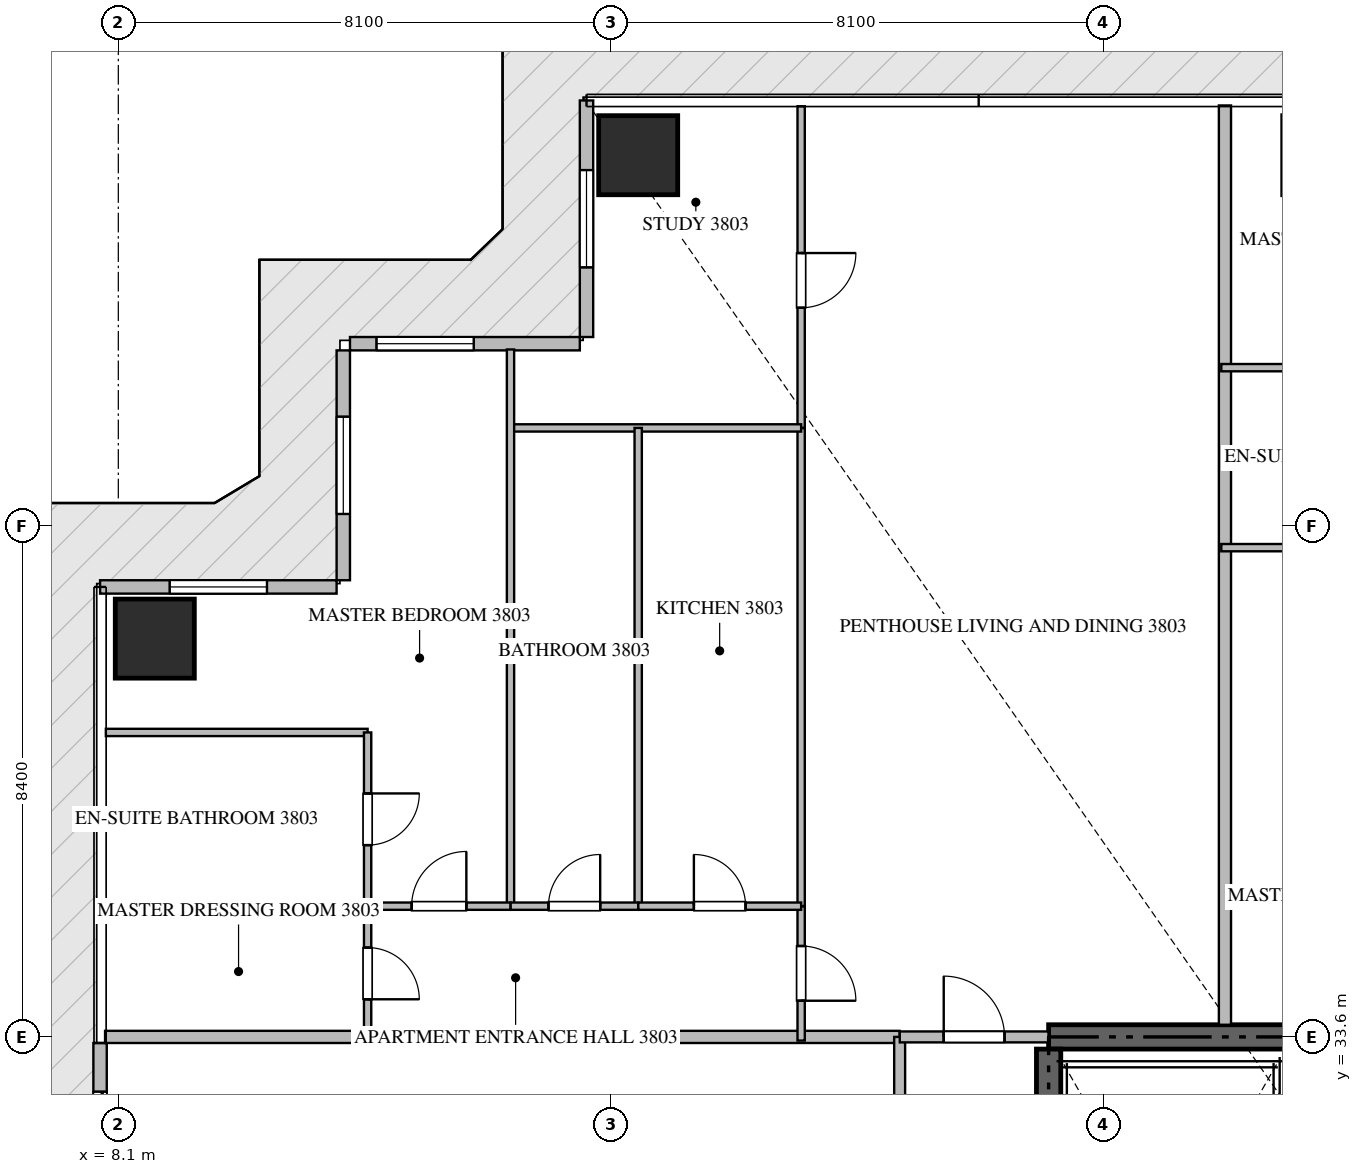
"""IFC4 building model, lengths in metres.
Left out: names, types, materials, properties, quantities, classifications, styles, units other than length and angle.
Written with IfcOpenShell. Run it as: python <this file> out.ifc"""

import sys

from ifc_helpers import new_model, si_unit, direction, frame, frame_2d, origin, origin_2d, place, context, subcontext, project, spatial, rectangle, extrude, source, transform, mapped, element, fill, save


model = new_model("IFC4")
c1 = context("Model", 3, precision=1e-05, world=origin(), true_north=direction((0.0, 1.0)))
c2 = subcontext(c1, "Body", "Model", "MODEL_VIEW")
j1 = project(units=[si_unit("LENGTHUNIT", "METRE"), si_unit("PLANEANGLEUNIT", "RADIAN")], contexts=[c1])
p1 = place(None, origin())
s1 = spatial("IfcSite", under=j1, at=p1, CompositionType="ELEMENT")
p2 = place(p1, origin())
s2 = spatial("IfcBuilding", under=s1, at=p2, CompositionType="ELEMENT")
p3 = place(p2, frame((0.0, 0.0, 153.9)))
s3 = spatial("IfcBuildingStorey", under=s2, at=p3, CompositionType="ELEMENT", Elevation=153.9)
p4 = place(p3, frame((41.4, 33.6, -0.26), z_axis=(0.0, 0.0, 1.0), x_axis=(-1.0, 0.0, 0.0)))
e1 = element("IfcWall", 1, at=p4, inside=s3, PredefinedType="SHEAR", context=c2, shape_type="SweptSolid", body=[
    extrude(rectangle(XDim=18.0, YDim=0.4, at=frame_2d((9.0, 0.0))), origin(), (0.0, 0.0, 1.0), 3.748),
])
p5 = place(p3, frame((23.4, 24.25, -0.26), z_axis=(0.0, 0.0, 1.0), x_axis=(0.0, 1.0, 0.0)))
e2 = element("IfcWall", 2, at=p5, inside=s3, PredefinedType="SHEAR", context=c2, shape_type="SweptSolid", body=[
    extrude(rectangle(XDim=9.15, YDim=0.4, at=frame_2d((4.575, 0.0))), origin(), (0.0, 0.0, 1.0), 3.748),
])
m1 = source(origin(), c2, "Body", "SweptSolid", [
    extrude(rectangle(XDim=1.3, YDim=1.3, at=origin_2d()), origin(), (0.0, 0.0, 1.0), 3.75),
])
for number, where, z_axis, x_axis in (
    (3, (16.65, 48.1, -0.26), (0.0, 0.0, 1.0), (1.0, 0.0, 0.0)),
    (4, (8.7, 40.15, -0.26), (0.0, 0.0, 1.0), (1.0, 0.0, 0.0)),
):
    element("IfcColumn", number, at=place(p3, frame(where, z_axis=z_axis, x_axis=x_axis)), inside=s3, PredefinedType="COLUMN", context=c2, shape_type="MappedRepresentation", body=[
        mapped(m1, transform((0.0, 0.0, 0.0), scale=1.0)),
    ])
p6 = place(p3, frame((15.8, 49.0, 0.0), z_axis=(0.0, 0.0, 1.0), x_axis=(0.0, -1.0, 0.0)))
e5 = element("IfcWall", 5, at=p6, inside=s3, PredefinedType="ELEMENTEDWALL", context=c2, shape_type="SweptSolid", body=[
    extrude(rectangle(XDim=3.89, YDim=0.22, at=frame_2d((1.945, 0.0))), origin(), (0.0, 0.0, 1.0), 3.475),
])
p7 = place(p6, frame((1.145, 0.0, 0.65)))
e6 = element("IfcOpeningElement", 6, at=p7, cuts=e5, PredefinedType="OPENING", context=c2, shape_type="SweptSolid", body=[
    extrude(rectangle(XDim=1.6, YDim=2.1, at=frame_2d((0.8, 1.05))), frame((0.0, 0.12, 0.0), z_axis=(0.0, -1.0, 0.0), x_axis=(1.0, 0.0, 0.0)), (0.0, 0.0, 1.0), 0.24),
])
p8 = place(p3, frame((15.69, 45.0, 0.0), z_axis=(0.0, 0.0, 1.0), x_axis=(-1.0, 0.0, 0.0)))
e7 = element("IfcWall", 7, at=p8, inside=s3, PredefinedType="ELEMENTEDWALL", context=c2, shape_type="SweptSolid", body=[
    extrude(rectangle(XDim=3.78, YDim=0.22, at=frame_2d((1.89, 0.0))), origin(), (0.0, 0.0, 1.0), 3.475),
])
p9 = place(p8, frame((1.744, 0.0, 0.65)))
e8 = element("IfcOpeningElement", 8, at=p9, cuts=e7, PredefinedType="OPENING", context=c2, shape_type="SweptSolid", body=[
    extrude(rectangle(XDim=1.6, YDim=2.1, at=frame_2d((0.8, 1.05))), frame((0.0, 0.12, 0.0), z_axis=(0.0, -1.0, 0.0), x_axis=(1.0, 0.0, 0.0)), (0.0, 0.0, 1.0), 0.24),
])
p10 = place(p3, frame((11.8, 44.89, 0.0), z_axis=(0.0, 0.0, 1.0), x_axis=(0.0, -1.0, 0.0)))
e9 = element("IfcWall", 9, at=p10, inside=s3, PredefinedType="ELEMENTEDWALL", context=c2, shape_type="SweptSolid", body=[
    extrude(rectangle(XDim=3.78, YDim=0.22, at=frame_2d((1.89, 0.0))), origin(), (0.0, 0.0, 1.0), 3.475),
])
p11 = place(p10, frame((1.09, 0.0, 0.65)))
e10 = element("IfcOpeningElement", 10, at=p11, cuts=e9, PredefinedType="OPENING", context=c2, shape_type="SweptSolid", body=[
    extrude(rectangle(XDim=1.6, YDim=2.1, at=frame_2d((0.8, 1.05))), frame((0.0, 0.12, 0.0), z_axis=(0.0, -1.0, 0.0), x_axis=(1.0, 0.0, 0.0)), (0.0, 0.0, 1.0), 0.24),
])
p12 = place(p3, frame((11.69, 41.0, 0.0), z_axis=(0.0, 0.0, 1.0), x_axis=(-1.0, 0.0, 0.0)))
e11 = element("IfcWall", 11, at=p12, inside=s3, PredefinedType="ELEMENTEDWALL", context=c2, shape_type="SweptSolid", body=[
    extrude(rectangle(XDim=3.89, YDim=0.22, at=frame_2d((1.945, 0.0))), origin(), (0.0, 0.0, 1.0), 3.475),
])
p13 = place(p12, frame((1.145, 0.0, 0.65)))
e12 = element("IfcOpeningElement", 12, at=p13, cuts=e11, PredefinedType="OPENING", context=c2, shape_type="SweptSolid", body=[
    extrude(rectangle(XDim=1.6, YDim=2.1, at=frame_2d((0.8, 1.05))), frame((0.0, 0.12, 0.0), z_axis=(0.0, -1.0, 0.0), x_axis=(1.0, 0.0, 0.0)), (0.0, 0.0, 1.0), 0.24),
])
p14 = place(p3, frame((7.8, 33.5, 0.0), z_axis=(0.0, 0.0, 1.0), x_axis=(0.0, -1.0, 0.0)))
e13 = element("IfcWall", 13, at=p14, inside=s3, PredefinedType="ELEMENTEDWALL", context=c2, shape_type="SweptSolid", body=[
    extrude(rectangle(XDim=3.0, YDim=0.22, at=frame_2d((1.5, 0.0))), origin(), (0.0, 0.0, 1.0), 3.475),
])
p15 = place(p14, frame((0.8, 0.0, 0.0)))
e14 = element("IfcOpeningElement", 14, at=p15, cuts=e13, PredefinedType="OPENING", context=c2, shape_type="SweptSolid", body=[
    extrude(rectangle(XDim=1.4, YDim=2.25, at=frame_2d((0.7, 1.125))), frame((0.0, 0.12, 0.0), z_axis=(0.0, -1.0, 0.0), x_axis=(1.0, 0.0, 0.0)), (0.0, 0.0, 1.0), 0.24),
])
p16 = place(p3, frame((26.3, 33.8, 0.0), z_axis=(0.0, 0.0, 1.0), x_axis=(0.0, 1.0, 0.0)))
e15 = element("IfcWall", 15, at=p16, inside=s3, PredefinedType="PARTITIONING", context=c2, shape_type="SweptSolid", body=[
    extrude(rectangle(XDim=15.118, YDim=0.2, at=frame_2d((7.559, 0.0))), origin(), (0.0, 0.0, 1.0), 3.49),
])
p17 = place(p3, frame((7.882, 33.6, 0.0), z_axis=(0.0, 0.0, 1.0), x_axis=(1.0, 0.0, 0.0)))
e16 = element("IfcWall", 16, at=p17, inside=s3, PredefinedType="PARTITIONING", context=c2, shape_type="SweptSolid", body=[
    extrude(rectangle(XDim=13.068, YDim=0.2, at=frame_2d((6.534, 0.0))), origin(), (0.0, 0.0, 1.0), 3.49),
])
p18 = place(p3, frame((20.95, 14.9, 0.0), z_axis=(0.0, 0.0, 1.0), x_axis=(0.0, 1.0, 0.0)))
e17 = element("IfcWall", 17, at=p18, inside=s3, PredefinedType="PARTITIONING", context=c2, shape_type="SweptSolid", body=[
    extrude(rectangle(XDim=18.7, YDim=0.18, at=frame_2d((9.35, 0.0))), origin(), (0.0, 0.0, 1.0), 3.49),
])
p19 = place(p18, frame((1.805, 0.0, 0.0)))
e18 = element("IfcOpeningElement", 18, at=p19, cuts=e17, PredefinedType="OPENING", context=c2, shape_type="SweptSolid", body=[
    extrude(rectangle(XDim=1.0, YDim=2.15, at=frame_2d((0.5, 1.075))), frame((0.0, 0.1, 0.0), z_axis=(0.0, -1.0, 0.0), x_axis=(1.0, 0.0, 0.0)), (0.0, 0.0, 1.0), 0.2),
])
p20 = place(p18, frame((15.027, 0.0, 0.0)))
e19 = element("IfcOpeningElement", 19, at=p20, cuts=e17, PredefinedType="OPENING", context=c2, shape_type="SweptSolid", body=[
    extrude(rectangle(XDim=1.0, YDim=2.15, at=frame_2d((0.5, 1.075))), frame((0.0, 0.1, 0.0), z_axis=(0.0, -1.0, 0.0), x_axis=(1.0, 0.0, 0.0)), (0.0, 0.0, 1.0), 0.2),
])
p21 = place(p3, frame((20.952, 33.6, 0.0), z_axis=(0.0, 0.0, 1.0), x_axis=(1.0, 0.0, 0.0)))
e20 = element("IfcWall", 20, at=p21, inside=s3, PredefinedType="PARTITIONING", context=c2, shape_type="SweptSolid", body=[
    extrude(rectangle(XDim=2.446, YDim=0.18, at=frame_2d((1.223, 0.0))), origin(), (0.0, 0.0, 1.0), 3.49),
])
p22 = place(p21, frame((0.723, 0.0, 0.0)))
e21 = element("IfcOpeningElement", 21, at=p22, cuts=e20, PredefinedType="OPENING", context=c2, shape_type="SweptSolid", body=[
    extrude(rectangle(XDim=1.0, YDim=2.15, at=frame_2d((0.5, 1.075))), frame((0.0, 0.1, 0.0), z_axis=(0.0, -1.0, 0.0), x_axis=(1.0, 0.0, 0.0)), (0.0, 0.0, 1.0), 0.2),
])
p23 = place(p3, frame((19.33, 35.75, 0.0), z_axis=(0.0, 0.0, 1.0), x_axis=(0.0, -1.0, 0.0)))
e22 = element("IfcWall", 22, at=p23, inside=s3, PredefinedType="PARTITIONING", context=c2, shape_type="SweptSolid", body=[
    extrude(rectangle(XDim=2.21, YDim=0.12, at=frame_2d((1.105, 0.0))), origin(), (0.0, 0.0, 1.0), 3.49),
])
p24 = place(p23, frame((0.655, 0.0, 0.0)))
e23 = element("IfcOpeningElement", 23, at=p24, cuts=e22, PredefinedType="OPENING", context=c2, shape_type="SweptSolid", body=[
    extrude(rectangle(XDim=0.9, YDim=2.1, at=frame_2d((0.45, 1.05))), frame((0.0, 0.07, 0.0), z_axis=(0.0, -1.0, 0.0), x_axis=(1.0, 0.0, 0.0)), (0.0, 0.0, 1.0), 0.14),
])
p25 = place(p3, frame((19.33, 48.905, 0.0), z_axis=(0.0, 0.0, 1.0), x_axis=(0.0, -1.0, 0.0)))
e24 = element("IfcWall", 24, at=p25, inside=s3, PredefinedType="PARTITIONING", context=c2, shape_type="SweptSolid", body=[
    extrude(rectangle(XDim=5.29, YDim=0.12, at=frame_2d((2.645, 0.0))), origin(), (0.0, 0.0, 1.0), 3.49),
])
p26 = place(p25, frame((2.414, 0.0, 0.0)))
e25 = element("IfcOpeningElement", 25, at=p26, cuts=e24, PredefinedType="OPENING", context=c2, shape_type="SweptSolid", body=[
    extrude(rectangle(XDim=0.9, YDim=2.1, at=frame_2d((0.45, 1.05))), frame((0.0, 0.07, 0.0), z_axis=(0.0, -1.0, 0.0), x_axis=(1.0, 0.0, 0.0)), (0.0, 0.0, 1.0), 0.14),
])
p27 = place(p3, frame((19.33, 43.613, 0.0), z_axis=(0.0, 0.0, 1.0), x_axis=(0.0, -1.0, 0.0)))
e26 = element("IfcWall", 26, at=p27, inside=s3, PredefinedType="PARTITIONING", context=c2, shape_type="SweptSolid", body=[
    extrude(rectangle(XDim=7.861, YDim=0.12, at=frame_2d((3.931, 0.0))), origin(), (0.0, 0.0, 1.0), 3.49),
])
p28 = place(p3, frame((14.55, 43.615, 0.0), z_axis=(0.0, 0.0, 1.0), x_axis=(1.0, 0.0, 0.0)))
e27 = element("IfcWall", 27, at=p28, inside=s3, PredefinedType="PARTITIONING", context=c2, shape_type="SweptSolid", body=[
    extrude(rectangle(XDim=4.78, YDim=0.12, at=frame_2d((2.39, 0.0))), origin(), (0.0, 0.0, 1.0), 3.49),
])
p29 = place(p3, frame((14.55, 44.905, 0.0), z_axis=(0.0, 0.0, 1.0), x_axis=(0.0, -1.0, 0.0)))
e28 = element("IfcWall", 28, at=p29, inside=s3, PredefinedType="PARTITIONING", context=c2, shape_type="SweptSolid", body=[
    extrude(rectangle(XDim=9.155, YDim=0.12, at=frame_2d((4.578, 0.0))), origin(), (0.0, 0.0, 1.0), 3.49),
])
p30 = place(p3, frame((16.65, 43.615, 0.0), z_axis=(0.0, 0.0, 1.0), x_axis=(0.0, -1.0, 0.0)))
e29 = element("IfcWall", 29, at=p30, inside=s3, PredefinedType="PARTITIONING", context=c2, shape_type="SweptSolid", body=[
    extrude(rectangle(XDim=7.865, YDim=0.12, at=frame_2d((3.933, 0.0))), origin(), (0.0, 0.0, 1.0), 2.972),
])
p31 = place(p3, frame((14.55, 35.75, 0.0), z_axis=(0.0, 0.0, 1.0), x_axis=(1.0, 0.0, 0.0)))
e30 = element("IfcWall", 30, at=p31, inside=s3, PredefinedType="PARTITIONING", context=c2, shape_type="SweptSolid", body=[
    extrude(rectangle(XDim=2.1, YDim=0.12, at=frame_2d((1.05, 0.0))), origin(), (0.0, 0.0, 1.0), 3.49),
])
p32 = place(p31, frame((0.625, 0.0, 0.0)))
e31 = element("IfcOpeningElement", 31, at=p32, cuts=e30, PredefinedType="OPENING", context=c2, shape_type="SweptSolid", body=[
    extrude(rectangle(XDim=0.85, YDim=2.1, at=frame_2d((0.425, 1.05))), frame((0.0, 0.07, 0.0), z_axis=(0.0, -1.0, 0.0), x_axis=(1.0, 0.0, 0.0)), (0.0, 0.0, 1.0), 0.14),
])
p33 = place(p3, frame((16.652, 35.75, 0.0), z_axis=(0.0, 0.0, 1.0), x_axis=(1.0, 0.0, 0.0)))
e32 = element("IfcWall", 32, at=p33, inside=s3, PredefinedType="PARTITIONING", context=c2, shape_type="SweptSolid", body=[
    extrude(rectangle(XDim=2.678, YDim=0.12, at=frame_2d((1.339, 0.0))), origin(), (0.0, 0.0, 1.0), 3.49),
])
p34 = place(p33, frame((0.914, 0.0, 0.0)))
e33 = element("IfcOpeningElement", 33, at=p34, cuts=e32, PredefinedType="OPENING", context=c2, shape_type="SweptSolid", body=[
    extrude(rectangle(XDim=0.85, YDim=2.1, at=frame_2d((0.425, 1.05))), frame((0.0, 0.07, 0.0), z_axis=(0.0, -1.0, 0.0), x_axis=(1.0, 0.0, 0.0)), (0.0, 0.0, 1.0), 0.14),
])
p35 = place(p3, frame((12.2, 35.75, 0.0), z_axis=(0.0, 0.0, 1.0), x_axis=(1.0, 0.0, 0.0)))
e34 = element("IfcWall", 34, at=p35, inside=s3, PredefinedType="PARTITIONING", context=c2, shape_type="SweptSolid", body=[
    extrude(rectangle(XDim=2.348, YDim=0.12, at=frame_2d((1.174, 0.0))), origin(), (0.0, 0.0, 1.0), 3.49),
])
p36 = place(p35, frame((0.724, 0.0, 0.0)))
e35 = element("IfcOpeningElement", 35, at=p36, cuts=e34, PredefinedType="OPENING", context=c2, shape_type="SweptSolid", body=[
    extrude(rectangle(XDim=0.9, YDim=2.1, at=frame_2d((0.45, 1.05))), frame((0.0, 0.07, 0.0), z_axis=(0.0, -1.0, 0.0), x_axis=(1.0, 0.0, 0.0)), (0.0, 0.0, 1.0), 0.14),
])
p37 = place(p3, frame((7.895, 38.607, 0.0), z_axis=(0.0, 0.0, 1.0), x_axis=(1.0, 0.0, 0.0)))
e36 = element("IfcWall", 36, at=p37, inside=s3, PredefinedType="PARTITIONING", context=c2, shape_type="SweptSolid", body=[
    extrude(rectangle(XDim=4.305, YDim=0.12, at=frame_2d((2.152, 0.0))), origin(), (0.0, 0.0, 1.0), 3.49),
])
p38 = place(p3, frame((7.895, 35.75, 0.0), z_axis=(0.0, 0.0, 1.0), x_axis=(1.0, 0.0, 0.0)))
e37 = element("IfcWall", 37, at=p38, inside=s3, PredefinedType="PARTITIONING", context=c2, shape_type="SweptSolid", body=[
    extrude(rectangle(XDim=4.303, YDim=0.12, at=frame_2d((2.151, 0.0))), origin(), (0.0, 0.0, 1.0), 3.49),
])
p39 = place(p3, frame((12.2, 38.607, 0.0), z_axis=(0.0, 0.0, 1.0), x_axis=(0.0, -1.0, 0.0)))
e38 = element("IfcWall", 38, at=p39, inside=s3, PredefinedType="PARTITIONING", context=c2, shape_type="SweptSolid", body=[
    extrude(rectangle(XDim=2.857, YDim=0.12, at=frame_2d((1.428, 0.0))), origin(), (0.0, 0.0, 1.0), 3.49),
])
p40 = place(p39, frame((1.003, 0.0, 0.0)))
e39 = element("IfcOpeningElement", 39, at=p40, cuts=e38, PredefinedType="OPENING", context=c2, shape_type="SweptSolid", body=[
    extrude(rectangle(XDim=0.85, YDim=2.1, at=frame_2d((0.425, 1.05))), frame((0.0, 0.07, 0.0), z_axis=(0.0, -1.0, 0.0), x_axis=(1.0, 0.0, 0.0)), (0.0, 0.0, 1.0), 0.14),
])
p41 = place(p3, frame((12.2, 35.748, 0.0), z_axis=(0.0, 0.0, 1.0), x_axis=(0.0, -1.0, 0.0)))
e40 = element("IfcWall", 40, at=p41, inside=s3, PredefinedType="PARTITIONING", context=c2, shape_type="SweptSolid", body=[
    extrude(rectangle(XDim=2.208, YDim=0.12, at=frame_2d((1.104, 0.0))), origin(), (0.0, 0.0, 1.0), 3.49),
])
p42 = place(p41, frame((0.679, 0.0, 0.0)))
e41 = element("IfcOpeningElement", 41, at=p42, cuts=e40, PredefinedType="OPENING", context=c2, shape_type="SweptSolid", body=[
    extrude(rectangle(XDim=0.85, YDim=2.1, at=frame_2d((0.425, 1.05))), frame((0.0, 0.07, 0.0), z_axis=(0.0, -1.0, 0.0), x_axis=(1.0, 0.0, 0.0)), (0.0, 0.0, 1.0), 0.14),
])
for number, where, z_axis, x_axis in (
    (42, (26.24, 44.606, 0.0), (0.0, 0.0, 1.0), (1.0, 0.0, 0.0)),
    (43, (26.24, 41.646, 0.0), (0.0, 0.0, 1.0), (1.0, 0.0, 0.0)),
):
    element("IfcWall", number, at=place(p3, frame(where, z_axis=z_axis, x_axis=x_axis)), inside=s3, PredefinedType="PARTITIONING", context=c2, shape_type="SweptSolid", body=[
        extrude(rectangle(XDim=4.79, YDim=0.12, at=frame_2d((2.395, 0.0))), origin(), (0.0, 0.0, 1.0), 3.49),
    ])
m2 = source(origin(), c2, "Body", "SweptSolid", [
    extrude(rectangle(XDim=1.6, YDim=2.1, at=frame_2d((0.8, 1.05))), frame((0.0, 0.03, 0.0), z_axis=(0.0, -1.0, 0.0), x_axis=(1.0, 0.0, 0.0)), (0.0, 0.0, 1.0), 0.06),
])
p43 = place(p7, origin())
e44 = element("IfcWindow", 44, at=p43, inside=s3, PartitioningType="SINGLE_PANEL", PredefinedType="WINDOW", context=c2, shape_type="MappedRepresentation", body=[
    mapped(m2, transform((0.0, 0.0, 0.0), scale=1.0)),
])
fill(e6, e44)
p44 = place(p9, origin())
e45 = element("IfcWindow", 45, at=p44, inside=s3, PartitioningType="SINGLE_PANEL", PredefinedType="WINDOW", context=c2, shape_type="MappedRepresentation", body=[
    mapped(m2, transform((0.0, 0.0, 0.0), scale=1.0)),
])
fill(e8, e45)
p45 = place(p11, origin())
e46 = element("IfcWindow", 46, at=p45, inside=s3, PartitioningType="SINGLE_PANEL", PredefinedType="WINDOW", context=c2, shape_type="MappedRepresentation", body=[
    mapped(m2, transform((0.0, 0.0, 0.0), scale=1.0)),
])
fill(e10, e46)
p46 = place(p13, origin())
e47 = element("IfcWindow", 47, at=p46, inside=s3, PartitioningType="SINGLE_PANEL", PredefinedType="WINDOW", context=c2, shape_type="MappedRepresentation", body=[
    mapped(m2, transform((0.0, 0.0, 0.0), scale=1.0)),
])
fill(e12, e47)
m3 = source(origin(), c2, "Body", "SweptSolid", [
    extrude(rectangle(XDim=1.4, YDim=2.25, at=frame_2d((0.7, 1.125))), frame((0.0, 0.025, 0.0), z_axis=(0.0, -1.0, 0.0), x_axis=(1.0, 0.0, 0.0)), (0.0, 0.0, 1.0), 0.05),
])
p47 = place(p15, origin())
e48 = element("IfcDoor", 48, at=p47, inside=s3, OperationType="SLIDING_TO_LEFT", PredefinedType="DOOR", context=c2, shape_type="MappedRepresentation", body=[
    mapped(m3, transform((0.0, 0.0, 0.0), scale=1.0)),
])
fill(e14, e48)
m4 = source(origin(), c2, "Body", "SweptSolid", [
    extrude(rectangle(XDim=1.0, YDim=2.15, at=frame_2d((0.5, 1.075))), frame((0.0, 0.025, 0.0), z_axis=(0.0, -1.0, 0.0), x_axis=(1.0, 0.0, 0.0)), (0.0, 0.0, 1.0), 0.05),
])
p48 = place(p22, origin())
e49 = element("IfcDoor", 49, at=p48, inside=s3, OperationType="SINGLE_SWING_LEFT", PredefinedType="DOOR", context=c2, shape_type="MappedRepresentation", body=[
    mapped(m4, transform((0.0, 0.0, 0.0), scale=1.0)),
])
fill(e21, e49)
m5 = source(origin(), c2, "Body", "SweptSolid", [
    extrude(rectangle(XDim=0.9, YDim=2.1, at=frame_2d((0.45, 1.05))), frame((0.0, 0.025, 0.0), z_axis=(0.0, -1.0, 0.0), x_axis=(1.0, 0.0, 0.0)), (0.0, 0.0, 1.0), 0.05),
])
p49 = place(p24, origin())
e50 = element("IfcDoor", 50, at=p49, inside=s3, OperationType="SINGLE_SWING_RIGHT", PredefinedType="DOOR", context=c2, shape_type="MappedRepresentation", body=[
    mapped(m5, transform((0.0, 0.0, 0.0), scale=1.0)),
])
fill(e23, e50)
p50 = place(p26, origin())
e51 = element("IfcDoor", 51, at=p50, inside=s3, OperationType="SINGLE_SWING_LEFT", PredefinedType="DOOR", context=c2, shape_type="MappedRepresentation", body=[
    mapped(m5, transform((0.0, 0.0, 0.0), scale=1.0)),
])
fill(e25, e51)
m6 = source(origin(), c2, "Body", "SweptSolid", [
    extrude(rectangle(XDim=0.85, YDim=2.1, at=frame_2d((0.425, 1.05))), frame((0.0, 0.025, 0.0), z_axis=(0.0, -1.0, 0.0), x_axis=(1.0, 0.0, 0.0)), (0.0, 0.0, 1.0), 0.05),
])
p51 = place(p32, origin())
e52 = element("IfcDoor", 52, at=p51, inside=s3, OperationType="SINGLE_SWING_RIGHT", PredefinedType="DOOR", context=c2, shape_type="MappedRepresentation", body=[
    mapped(m6, transform((0.0, 0.0, 0.0), scale=1.0)),
])
fill(e31, e52)
p52 = place(p34, origin())
e53 = element("IfcDoor", 53, at=p52, inside=s3, OperationType="SINGLE_SWING_LEFT", PredefinedType="DOOR", context=c2, shape_type="MappedRepresentation", body=[
    mapped(m6, transform((0.0, 0.0, 0.0), scale=1.0)),
])
fill(e33, e53)
p53 = place(p36, origin())
e54 = element("IfcDoor", 54, at=p53, inside=s3, OperationType="SINGLE_SWING_RIGHT", PredefinedType="DOOR", context=c2, shape_type="MappedRepresentation", body=[
    mapped(m5, transform((0.0, 0.0, 0.0), scale=1.0)),
])
fill(e35, e54)
p54 = place(p40, origin())
e55 = element("IfcDoor", 55, at=p54, inside=s3, OperationType="SINGLE_SWING_LEFT", PredefinedType="DOOR", context=c2, shape_type="MappedRepresentation", body=[
    mapped(m6, transform((0.0, 0.0, 0.0), scale=1.0)),
])
fill(e39, e55)
p55 = place(p42, origin())
e56 = element("IfcDoor", 56, at=p55, inside=s3, OperationType="SINGLE_SWING_RIGHT", PredefinedType="DOOR", context=c2, shape_type="MappedRepresentation", body=[
    mapped(m6, transform((0.0, 0.0, 0.0), scale=1.0)),
])
fill(e41, e56)
save(model, sys.argv[1])
